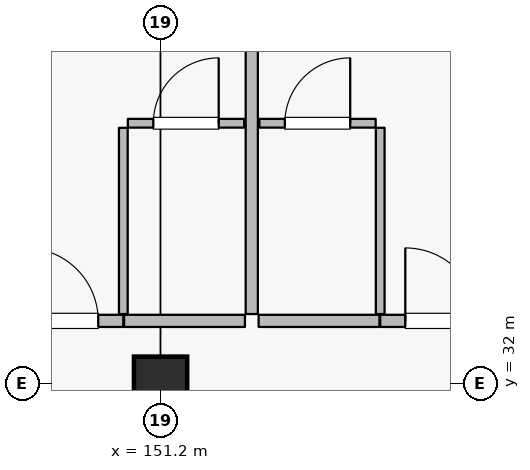
"""IFC4 building model, lengths in metres.
Left out: names, types, materials, properties, quantities, classifications, styles, units other than length and angle.
Written with IfcOpenShell. Run it as: python <this file> out.ifc"""

import sys

from ifc_helpers import new_model, si_unit, direction, frame, frame_2d, origin, origin_2d, place, context, subcontext, project, spatial, rectangle, extrude, element, fill, save


model = new_model("IFC4")
c1 = context("Model", 3, precision=1e-05, world=origin(), true_north=direction((0.0, 1.0)))
c2 = subcontext(c1, "Body", "Model", "MODEL_VIEW")
j1 = project(units=[si_unit("LENGTHUNIT", "METRE"), si_unit("PLANEANGLEUNIT", "RADIAN")], contexts=[c1])
p1 = place(None, origin())
s1 = spatial("IfcSite", under=j1, at=p1, CompositionType="ELEMENT")
p2 = place(p1, origin())
s2 = spatial("IfcBuilding", under=s1, at=p2, CompositionType="ELEMENT")
p3 = place(p2, frame((0.0, 0.0, 21.0)))
s3 = spatial("IfcBuildingStorey", under=s2, at=p3, CompositionType="ELEMENT", Elevation=21.0)
p4 = place(p3, frame((151.2, 32.0, 0.0), z_axis=(0.0, 0.0, 1.0), x_axis=(1.0, 0.0, 0.0)))
e1 = element("IfcColumn", 1, at=p4, inside=s3, PredefinedType="COLUMN", context=c2, shape_type="SweptSolid", body=[
    extrude(rectangle(XDim=0.7, YDim=0.7, at=origin_2d()), origin(), (0.0, 0.0, 1.0), 4.2),
])
p5 = place(p3, frame((143.2, 32.381, 0.0), z_axis=(0.0, 0.0, 1.0), x_axis=(0.724156739794, 0.689635422677, 0.0)))
e2 = element("IfcWall", 2, at=p5, inside=s3, PredefinedType="SOLIDWALL", context=c2, shape_type="SweptSolid", body=[
    extrude(rectangle(XDim=10.495, YDim=0.24, at=frame_2d((5.248, 0.0))), origin(), (0.0, 0.0, 1.0), 3.53),
])
p6 = place(p5, frame((0.788, 0.0, 0.8)))
e3 = element("IfcOpeningElement", 3, at=p6, cuts=e2, PredefinedType="OPENING", context=c2, shape_type="SweptSolid", body=[
    extrude(rectangle(XDim=1.6, YDim=1.6, at=frame_2d((0.8, 0.8))), frame((0.0, 0.13, 0.0), z_axis=(0.0, -1.0, 0.0), x_axis=(1.0, 0.0, 0.0)), (0.0, 0.0, 1.0), 0.26),
])
p7 = place(p5, frame((4.862, 0.0, 0.8)))
e4 = element("IfcOpeningElement", 4, at=p7, cuts=e2, PredefinedType="OPENING", context=c2, shape_type="SweptSolid", body=[
    extrude(rectangle(XDim=1.6, YDim=1.6, at=frame_2d((0.8, 0.8))), frame((0.0, 0.13, 0.0), z_axis=(0.0, -1.0, 0.0), x_axis=(1.0, 0.0, 0.0)), (0.0, 0.0, 1.0), 0.26),
])
p8 = place(p5, frame((8.521, 0.0, 0.8)))
e5 = element("IfcOpeningElement", 5, at=p8, cuts=e2, PredefinedType="OPENING", context=c2, shape_type="SweptSolid", body=[
    extrude(rectangle(XDim=1.6, YDim=1.6, at=frame_2d((0.8, 0.8))), frame((0.0, 0.13, 0.0), z_axis=(0.0, -1.0, 0.0), x_axis=(1.0, 0.0, 0.0)), (0.0, 0.0, 1.0), 0.26),
])
p9 = place(p3, frame((149.09, 32.82, 0.0), z_axis=(0.0, 0.0, 1.0), x_axis=(1.0, 0.0, 0.0)))
e6 = element("IfcWall", 6, at=p9, inside=s3, PredefinedType="PARTITIONING", context=c2, shape_type="SweptSolid", body=[
    extrude(rectangle(XDim=1.62, YDim=0.16, at=frame_2d((0.81, 0.0))), origin(), (0.0, 0.0, 1.0), 3.965),
])
p10 = place(p9, frame((0.33, 0.0, 0.0)))
e7 = element("IfcOpeningElement", 7, at=p10, cuts=e6, PredefinedType="OPENING", context=c2, shape_type="SweptSolid", body=[
    extrude(rectangle(XDim=0.96, YDim=2.2, at=frame_2d((0.48, 1.1))), frame((0.0, 0.09, 0.0), z_axis=(0.0, -1.0, 0.0), x_axis=(1.0, 0.0, 0.0)), (0.0, 0.0, 1.0), 0.18),
])
p11 = place(p3, frame((150.72, 32.82, 0.0), z_axis=(0.0, 0.0, 1.0), x_axis=(1.0, 0.0, 0.0)))
e8 = element("IfcWall", 8, at=p11, inside=s3, PredefinedType="PARTITIONING", context=c2, shape_type="SweptSolid", body=[
    extrude(rectangle(XDim=1.59, YDim=0.16, at=frame_2d((0.795, 0.0))), origin(), (0.0, 0.0, 1.0), 3.965),
])
p12 = place(p3, frame((150.71, 32.91, 0.0), z_axis=(0.0, 0.0, 1.0), x_axis=(0.0, 1.0, 0.0)))
e9 = element("IfcWall", 9, at=p12, inside=s3, PredefinedType="PARTITIONING", context=c2, shape_type="SweptSolid", body=[
    extrude(rectangle(XDim=2.45, YDim=0.115, at=frame_2d((1.225, 0.0))), origin(), (0.0, 0.0, 1.0), 3.965),
])
p13 = place(p3, frame((150.77, 35.42, 0.0), z_axis=(0.0, 0.0, 1.0), x_axis=(1.0, 0.0, 0.0)))
e10 = element("IfcWall", 10, at=p13, inside=s3, PredefinedType="PARTITIONING", context=c2, shape_type="SweptSolid", body=[
    extrude(rectangle(XDim=1.53, YDim=0.115, at=frame_2d((0.765, 0.0))), origin(), (0.0, 0.0, 1.0), 3.965),
])
p14 = place(p13, frame((0.335, 0.0, 0.0)))
e11 = element("IfcOpeningElement", 11, at=p14, cuts=e10, PredefinedType="OPENING", context=c2, shape_type="SweptSolid", body=[
    extrude(rectangle(XDim=0.86, YDim=2.12, at=frame_2d((0.43, 1.06))), frame((0.0, 0.067, 0.0), z_axis=(0.0, -1.0, 0.0), x_axis=(1.0, 0.0, 0.0)), (0.0, 0.0, 1.0), 0.135),
])
p15 = place(p3, frame((152.49, 32.82, 0.0), z_axis=(0.0, 0.0, 1.0), x_axis=(1.0, 0.0, 0.0)))
e12 = element("IfcWall", 12, at=p15, inside=s3, PredefinedType="PARTITIONING", context=c2, shape_type="SweptSolid", body=[
    extrude(rectangle(XDim=1.59, YDim=0.16, at=frame_2d((0.795, 0.0))), origin(), (0.0, 0.0, 1.0), 3.965),
])
p16 = place(p3, frame((154.09, 32.82, 0.0), z_axis=(0.0, 0.0, 1.0), x_axis=(1.0, 0.0, 0.0)))
e13 = element("IfcWall", 13, at=p16, inside=s3, PredefinedType="PARTITIONING", context=c2, shape_type="SweptSolid", body=[
    extrude(rectangle(XDim=1.62, YDim=0.16, at=frame_2d((0.81, 0.0))), origin(), (0.0, 0.0, 1.0), 3.965),
])
p17 = place(p16, frame((0.33, 0.0, 0.0)))
e14 = element("IfcOpeningElement", 14, at=p17, cuts=e13, PredefinedType="OPENING", context=c2, shape_type="SweptSolid", body=[
    extrude(rectangle(XDim=0.96, YDim=2.2, at=frame_2d((0.48, 1.1))), frame((0.0, 0.09, 0.0), z_axis=(0.0, -1.0, 0.0), x_axis=(1.0, 0.0, 0.0)), (0.0, 0.0, 1.0), 0.18),
])
p18 = place(p3, frame((154.09, 32.91, 0.0), z_axis=(0.0, 0.0, 1.0), x_axis=(0.0, 1.0, 0.0)))
e15 = element("IfcWall", 15, at=p18, inside=s3, PredefinedType="PARTITIONING", context=c2, shape_type="SweptSolid", body=[
    extrude(rectangle(XDim=2.45, YDim=0.115, at=frame_2d((1.225, 0.0))), origin(), (0.0, 0.0, 1.0), 3.965),
])
p19 = place(p3, frame((152.5, 35.42, 0.0), z_axis=(0.0, 0.0, 1.0), x_axis=(1.0, 0.0, 0.0)))
e16 = element("IfcWall", 16, at=p19, inside=s3, PredefinedType="PARTITIONING", context=c2, shape_type="SweptSolid", body=[
    extrude(rectangle(XDim=1.53, YDim=0.115, at=frame_2d((0.765, 0.0))), origin(), (0.0, 0.0, 1.0), 3.965),
])
p20 = place(p19, frame((0.335, 0.0, 0.0)))
e17 = element("IfcOpeningElement", 17, at=p20, cuts=e16, PredefinedType="OPENING", context=c2, shape_type="SweptSolid", body=[
    extrude(rectangle(XDim=0.86, YDim=2.12, at=frame_2d((0.43, 1.06))), frame((0.0, 0.067, 0.0), z_axis=(0.0, -1.0, 0.0), x_axis=(1.0, 0.0, 0.0)), (0.0, 0.0, 1.0), 0.135),
])
p21 = place(p3, frame((152.4, 32.91, 0.0), z_axis=(0.0, 0.0, 1.0), x_axis=(0.0, 1.0, 0.0)))
e18 = element("IfcWall", 18, at=p21, inside=s3, PredefinedType="PARTITIONING", context=c2, shape_type="SweptSolid", body=[
    extrude(rectangle(XDim=6.75, YDim=0.16, at=frame_2d((3.375, 0.0))), origin(), (0.0, 0.0, 1.0), 3.965),
])
p22 = place(p10, origin())
e19 = element("IfcDoor", 19, at=p22, inside=s3, OperationType="SINGLE_SWING_LEFT", PredefinedType="DOOR", context=c2, shape_type="SweptSolid", body=[
    extrude(rectangle(XDim=0.96, YDim=2.2, at=frame_2d((0.48, 1.1))), frame((0.0, 0.025, 0.0), z_axis=(0.0, -1.0, 0.0), x_axis=(1.0, 0.0, 0.0)), (0.0, 0.0, 1.0), 0.05),
])
fill(e7, e19)
p23 = place(p14, origin())
e20 = element("IfcDoor", 20, at=p23, inside=s3, OperationType="SINGLE_SWING_RIGHT", PredefinedType="DOOR", context=c2, shape_type="SweptSolid", body=[
    extrude(rectangle(XDim=0.86, YDim=2.12, at=frame_2d((0.43, 1.06))), frame((0.0, 0.025, 0.0), z_axis=(0.0, -1.0, 0.0), x_axis=(1.0, 0.0, 0.0)), (0.0, 0.0, 1.0), 0.05),
])
fill(e11, e20)
p24 = place(p17, origin())
e21 = element("IfcDoor", 21, at=p24, inside=s3, OperationType="SINGLE_SWING_LEFT", PredefinedType="DOOR", context=c2, shape_type="SweptSolid", body=[
    extrude(rectangle(XDim=0.96, YDim=2.2, at=frame_2d((0.48, 1.1))), frame((0.0, 0.025, 0.0), z_axis=(0.0, -1.0, 0.0), x_axis=(1.0, 0.0, 0.0)), (0.0, 0.0, 1.0), 0.05),
])
fill(e14, e21)
p25 = place(p20, origin())
e22 = element("IfcDoor", 22, at=p25, inside=s3, OperationType="SINGLE_SWING_RIGHT", PredefinedType="DOOR", context=c2, shape_type="SweptSolid", body=[
    extrude(rectangle(XDim=0.86, YDim=2.12, at=frame_2d((0.43, 1.06))), frame((0.0, 0.025, 0.0), z_axis=(0.0, -1.0, 0.0), x_axis=(1.0, 0.0, 0.0)), (0.0, 0.0, 1.0), 0.05),
])
fill(e17, e22)
save(model, sys.argv[1])
